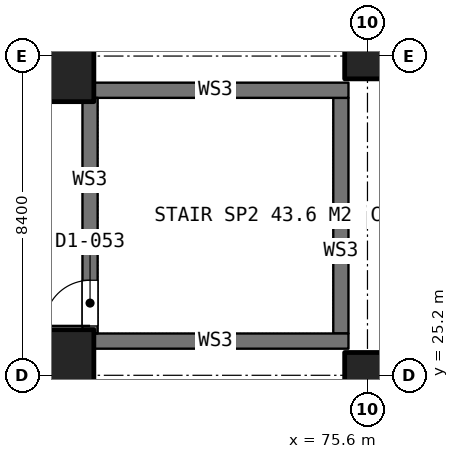
"""IFC4 building model, lengths in metres.
Left out: names, types, materials, properties, quantities, classifications, styles, units other than length and angle.
Written with IfcOpenShell. Run it as: python <this file> out.ifc"""

import sys

from ifc_helpers import new_model, si_unit, direction, frame, frame_2d, origin, origin_2d, place, context, subcontext, project, spatial, rectangle, extrude, element, fill, save


model = new_model("IFC4")
c1 = context("Model", 3, precision=1e-05, world=origin(), true_north=direction((0.0, 1.0)))
c2 = subcontext(c1, "Body", "Model", "MODEL_VIEW")
j1 = project(units=[si_unit("LENGTHUNIT", "METRE"), si_unit("PLANEANGLEUNIT", "RADIAN")], contexts=[c1])
p1 = place(None, origin())
s1 = spatial("IfcSite", under=j1, at=p1, CompositionType="ELEMENT")
p2 = place(p1, origin())
s2 = spatial("IfcBuilding", under=s1, at=p2, CompositionType="ELEMENT")
p3 = place(p2, frame((0.0, 0.0, 20.4)))
s3 = spatial("IfcBuildingStorey", under=s2, at=p3, CompositionType="ELEMENT", Elevation=20.4)
for number, where, z_axis, x_axis in (
    (1, (67.2, 25.2, 0.0), (0.0, 0.0, 1.0), (1.0, 0.0, 0.0)),
    (2, (67.2, 33.6, 0.0), (0.0, 0.0, 1.0), (1.0, 0.0, 0.0)),
):
    element("IfcColumn", number, at=place(p3, frame(where, z_axis=z_axis, x_axis=x_axis)), inside=s3, PredefinedType="COLUMN", context=c2, shape_type="SweptSolid", body=[
        extrude(rectangle(XDim=2.4, YDim=2.4, at=origin_2d()), origin(), (0.0, 0.0, 1.0), 5.0),
    ])
for number, where, z_axis, x_axis in (
    (3, (75.6, 25.2, 0.0), (0.0, 0.0, 1.0), (1.0, 0.0, 0.0)),
    (4, (75.6, 33.6, 0.0), (0.0, 0.0, 1.0), (1.0, 0.0, 0.0)),
):
    element("IfcColumn", number, at=place(p3, frame(where, z_axis=z_axis, x_axis=x_axis)), inside=s3, PredefinedType="COLUMN", context=c2, shape_type="SweptSolid", body=[
        extrude(rectangle(XDim=1.2, YDim=1.2, at=origin_2d()), origin(), (0.0, 0.0, 1.0), 5.0),
    ])
for number, where, z_axis, x_axis in (
    (5, (68.1, 26.1, 0.0), (0.0, 0.0, 1.0), (1.0, 0.0, 0.0)),
    (6, (68.1, 32.7, 0.0), (0.0, 0.0, 1.0), (1.0, 0.0, 0.0)),
):
    element("IfcWall", number, at=place(p3, frame(where, z_axis=z_axis, x_axis=x_axis)), inside=s3, PredefinedType="SOLIDWALL", context=c2, shape_type="SweptSolid", body=[
        extrude(rectangle(XDim=7.0, YDim=0.4, at=frame_2d((3.5, 0.0))), origin(), (0.0, 0.0, 1.0), 2.8),
    ])
p4 = place(p3, frame((68.3, 26.3, 0.0), z_axis=(0.0, 0.0, 1.0), x_axis=(0.0, 1.0, 0.0)))
e7 = element("IfcWall", 7, at=p4, inside=s3, PredefinedType="SOLIDWALL", context=c2, shape_type="SweptSolid", body=[
    extrude(rectangle(XDim=6.2, YDim=0.4, at=frame_2d((3.1, 0.0))), origin(), (0.0, 0.0, 1.0), 2.8),
])
p5 = place(p4, frame((0.2, 0.0, 0.0)))
e8 = element("IfcOpeningElement", 8, at=p5, cuts=e7, PredefinedType="OPENING", context=c2, shape_type="SweptSolid", body=[
    extrude(rectangle(XDim=1.2, YDim=2.1, at=frame_2d((0.6, 1.05))), frame((0.0, 0.21, 0.0), z_axis=(0.0, -1.0, 0.0), x_axis=(1.0, 0.0, 0.0)), (0.0, 0.0, 1.0), 0.42),
])
p6 = place(p3, frame((74.9, 26.3, 0.0), z_axis=(0.0, 0.0, 1.0), x_axis=(0.0, 1.0, 0.0)))
e9 = element("IfcWall", 9, at=p6, inside=s3, PredefinedType="SOLIDWALL", context=c2, shape_type="SweptSolid", body=[
    extrude(rectangle(XDim=6.2, YDim=0.4, at=frame_2d((3.1, 0.0))), origin(), (0.0, 0.0, 1.0), 2.8),
])
p7 = place(p5, origin())
e10 = element("IfcDoor", 10, at=p7, inside=s3, OperationType="SINGLE_SWING_RIGHT", PredefinedType="DOOR", context=c2, shape_type="SweptSolid", body=[
    extrude(rectangle(XDim=1.2, YDim=2.1, at=frame_2d((0.6, 1.05))), frame((0.0, 0.025, 0.0), z_axis=(0.0, -1.0, 0.0), x_axis=(1.0, 0.0, 0.0)), (0.0, 0.0, 1.0), 0.05),
])
fill(e8, e10)
save(model, sys.argv[1])
